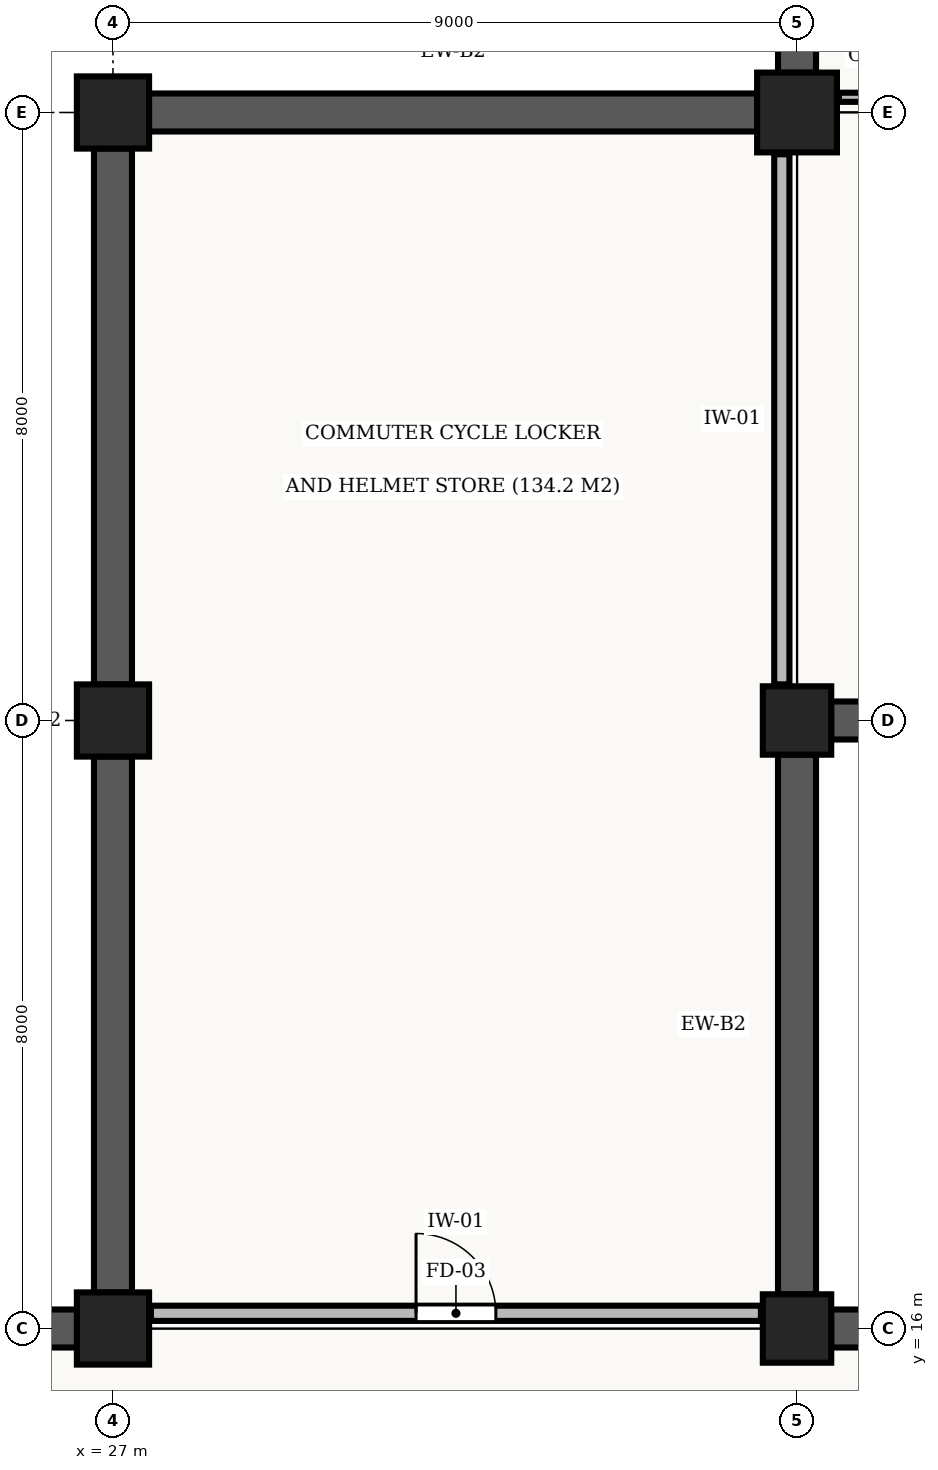
"""IFC4 building model, lengths in metres.
Left out: names, types, materials, properties, quantities, classifications, styles, units other than length and angle.
Written with IfcOpenShell. Run it as: python <this file> out.ifc"""

import sys

from ifc_helpers import new_model, si_unit, direction, frame, frame_2d, origin, origin_2d, place, context, subcontext, project, spatial, rectangle, extrude, element, fill, save


model = new_model("IFC4")
c1 = context("Model", 3, precision=1e-05, world=origin(), true_north=direction((0.0, 1.0)))
c2 = subcontext(c1, "Body", "Model", "MODEL_VIEW")
j1 = project(units=[si_unit("LENGTHUNIT", "METRE"), si_unit("PLANEANGLEUNIT", "RADIAN")], contexts=[c1])
p1 = place(None, origin())
s1 = spatial("IfcSite", under=j1, at=p1, CompositionType="ELEMENT")
p2 = place(p1, origin())
s2 = spatial("IfcBuilding", under=s1, at=p2, CompositionType="ELEMENT")
p3 = place(p2, frame((0.0, 0.0, -6.0)))
s3 = spatial("IfcBuildingStorey", under=s2, at=p3, CompositionType="ELEMENT", Elevation=-6.0)
for number, where, z_axis, x_axis in (
    (1, (27.0, 16.0, 0.0), (0.0, 0.0, 1.0), (1.0, 0.0, 0.0)),
    (2, (27.0, 24.0, 0.0), (0.0, 0.0, 1.0), (1.0, 0.0, 0.0)),
    (3, (27.0, 32.0, 0.0), (0.0, 0.0, 1.0), (1.0, 0.0, 0.0)),
):
    element("IfcColumn", number, at=place(p3, frame(where, z_axis=z_axis, x_axis=x_axis)), inside=s3, PredefinedType="COLUMN", context=c2, shape_type="SweptSolid", body=[
        extrude(rectangle(XDim=0.95, YDim=0.95, at=origin_2d()), origin(), (0.0, 0.0, 1.0), 6.0),
    ])
for number, where, z_axis, x_axis in (
    (4, (36.0, 16.0, 0.0), (0.0, 0.0, 1.0), (1.0, 0.0, 0.0)),
    (5, (36.0, 24.0, 0.0), (0.0, 0.0, 1.0), (1.0, 0.0, 0.0)),
):
    element("IfcColumn", number, at=place(p3, frame(where, z_axis=z_axis, x_axis=x_axis)), inside=s3, PredefinedType="COLUMN", context=c2, shape_type="SweptSolid", body=[
        extrude(rectangle(XDim=0.9, YDim=0.9, at=origin_2d()), origin(), (0.0, 0.0, 1.0), 6.0),
    ])
p4 = place(p3, frame((36.0, 32.0, 0.0), z_axis=(0.0, 0.0, 1.0), x_axis=(1.0, 0.0, 0.0)))
e6 = element("IfcColumn", 6, at=p4, inside=s3, PredefinedType="COLUMN", context=c2, shape_type="SweptSolid", body=[
    extrude(rectangle(XDim=1.05, YDim=1.05, at=origin_2d()), origin(), (0.0, 0.0, 1.0), 6.0),
])
p5 = place(p3, frame((18.423, 16.0, 0.0), z_axis=(0.0, 0.0, 1.0), x_axis=(1.0, 0.0, 0.0)))
e7 = element("IfcWall", 7, at=p5, inside=s3, PredefinedType="STANDARD", context=c2, shape_type="SweptSolid", body=[
    extrude(rectangle(XDim=8.104, YDim=0.5, at=frame_2d((4.052, 0.0))), origin(), (0.0, 0.0, 1.0), 5.56),
])
for number, where, z_axis, x_axis in (
    (8, (27.0, 16.473, 0.0), (0.0, 0.0, 1.0), (0.0, 1.0, 0.0)),
    (9, (27.0, 24.473, 0.0), (0.0, 0.0, 1.0), (0.0, 1.0, 0.0)),
):
    element("IfcWall", number, at=place(p3, frame(where, z_axis=z_axis, x_axis=x_axis)), inside=s3, PredefinedType="STANDARD", context=c2, shape_type="SweptSolid", body=[
        extrude(rectangle(XDim=7.054, YDim=0.5, at=frame_2d((3.527, 0.0))), origin(), (0.0, 0.0, 1.0), 5.56),
    ])
p6 = place(p3, frame((27.473, 32.0, 0.0), z_axis=(0.0, 0.0, 1.0), x_axis=(1.0, 0.0, 0.0)))
e10 = element("IfcWall", 10, at=p6, inside=s3, PredefinedType="STANDARD", context=c2, shape_type="SweptSolid", body=[
    extrude(rectangle(XDim=8.004, YDim=0.5, at=frame_2d((4.002, 0.0))), origin(), (0.0, 0.0, 1.0), 5.56),
])
p7 = place(p3, frame((36.0, 32.523, 0.0), z_axis=(0.0, 0.0, 1.0), x_axis=(0.0, 1.0, 0.0)))
e11 = element("IfcWall", 11, at=p7, inside=s3, PredefinedType="STANDARD", context=c2, shape_type="SweptSolid", body=[
    extrude(rectangle(XDim=6.904, YDim=0.5, at=frame_2d((3.452, 0.0))), origin(), (0.0, 0.0, 1.0), 5.56),
])
p8 = place(p3, frame((44.552, 24.0, 0.0), z_axis=(0.0, 0.0, 1.0), x_axis=(-1.0, 0.0, 0.0)))
e12 = element("IfcWall", 12, at=p8, inside=s3, PredefinedType="STANDARD", context=c2, shape_type="SweptSolid", body=[
    extrude(rectangle(XDim=8.104, YDim=0.5, at=frame_2d((4.052, 0.0))), origin(), (0.0, 0.0, 1.0), 5.56),
])
p9 = place(p3, frame((36.0, 23.552, 0.0), z_axis=(0.0, 0.0, 1.0), x_axis=(0.0, -1.0, 0.0)))
e13 = element("IfcWall", 13, at=p9, inside=s3, PredefinedType="STANDARD", context=c2, shape_type="SweptSolid", body=[
    extrude(rectangle(XDim=7.104, YDim=0.5, at=frame_2d((3.552, 0.0))), origin(), (0.0, 0.0, 1.0), 5.56),
])
p10 = place(p3, frame((36.448, 16.0, 0.0), z_axis=(0.0, 0.0, 1.0), x_axis=(1.0, 0.0, 0.0)))
e14 = element("IfcWall", 14, at=p10, inside=s3, PredefinedType="STANDARD", context=c2, shape_type="SweptSolid", body=[
    extrude(rectangle(XDim=8.104, YDim=0.5, at=frame_2d((4.052, 0.0))), origin(), (0.0, 0.0, 1.0), 5.56),
])
p11 = place(p3, frame((27.5, 16.2, 0.0), z_axis=(0.0, 0.0, 1.0), x_axis=(1.0, 0.0, 0.0)))
e15 = element("IfcWall", 15, at=p11, inside=s3, PredefinedType="STANDARD", context=c2, shape_type="SweptSolid", body=[
    extrude(rectangle(XDim=8.025, YDim=0.2, at=frame_2d((4.012, 0.0))), origin(), (0.0, 0.0, 1.0), 4.43),
])
p12 = place(p11, frame((3.488, 0.0, 0.0)))
e16 = element("IfcOpeningElement", 16, at=p12, cuts=e15, PredefinedType="OPENING", context=c2, shape_type="SweptSolid", body=[
    extrude(rectangle(XDim=1.05, YDim=2.15, at=frame_2d((0.525, 1.075))), frame((0.0, 0.112, 0.0), z_axis=(0.0, -1.0, 0.0), x_axis=(1.0, 0.0, 0.0)), (0.0, 0.0, 1.0), 0.224),
])
p13 = place(p3, frame((35.8, 24.475, 0.0), z_axis=(0.0, 0.0, 1.0), x_axis=(0.0, 1.0, 0.0)))
e17 = element("IfcWall", 17, at=p13, inside=s3, PredefinedType="STANDARD", context=c2, shape_type="SweptSolid", body=[
    extrude(rectangle(XDim=6.975, YDim=0.2, at=frame_2d((3.487, 0.0))), origin(), (0.0, 0.0, 1.0), 4.53),
])
p14 = place(p3, frame((36.55, 32.2, 0.0), z_axis=(0.0, 0.0, 1.0), x_axis=(1.0, 0.0, 0.0)))
e18 = element("IfcWall", 18, at=p14, inside=s3, PredefinedType="STANDARD", context=c2, shape_type="SweptSolid", body=[
    extrude(rectangle(XDim=6.85, YDim=0.12, at=frame_2d((3.425, 0.0))), origin(), (0.0, 0.0, 1.0), 4.38),
])
p15 = place(p12, origin())
e19 = element("IfcDoor", 19, at=p15, inside=s3, OperationType="SINGLE_SWING_LEFT", PredefinedType="DOOR", context=c2, shape_type="SweptSolid", body=[
    extrude(rectangle(XDim=1.05, YDim=2.15, at=frame_2d((0.525, 1.075))), frame((0.0, 0.025, 0.0), z_axis=(0.0, -1.0, 0.0), x_axis=(1.0, 0.0, 0.0)), (0.0, 0.0, 1.0), 0.05),
])
fill(e16, e19)
save(model, sys.argv[1])
